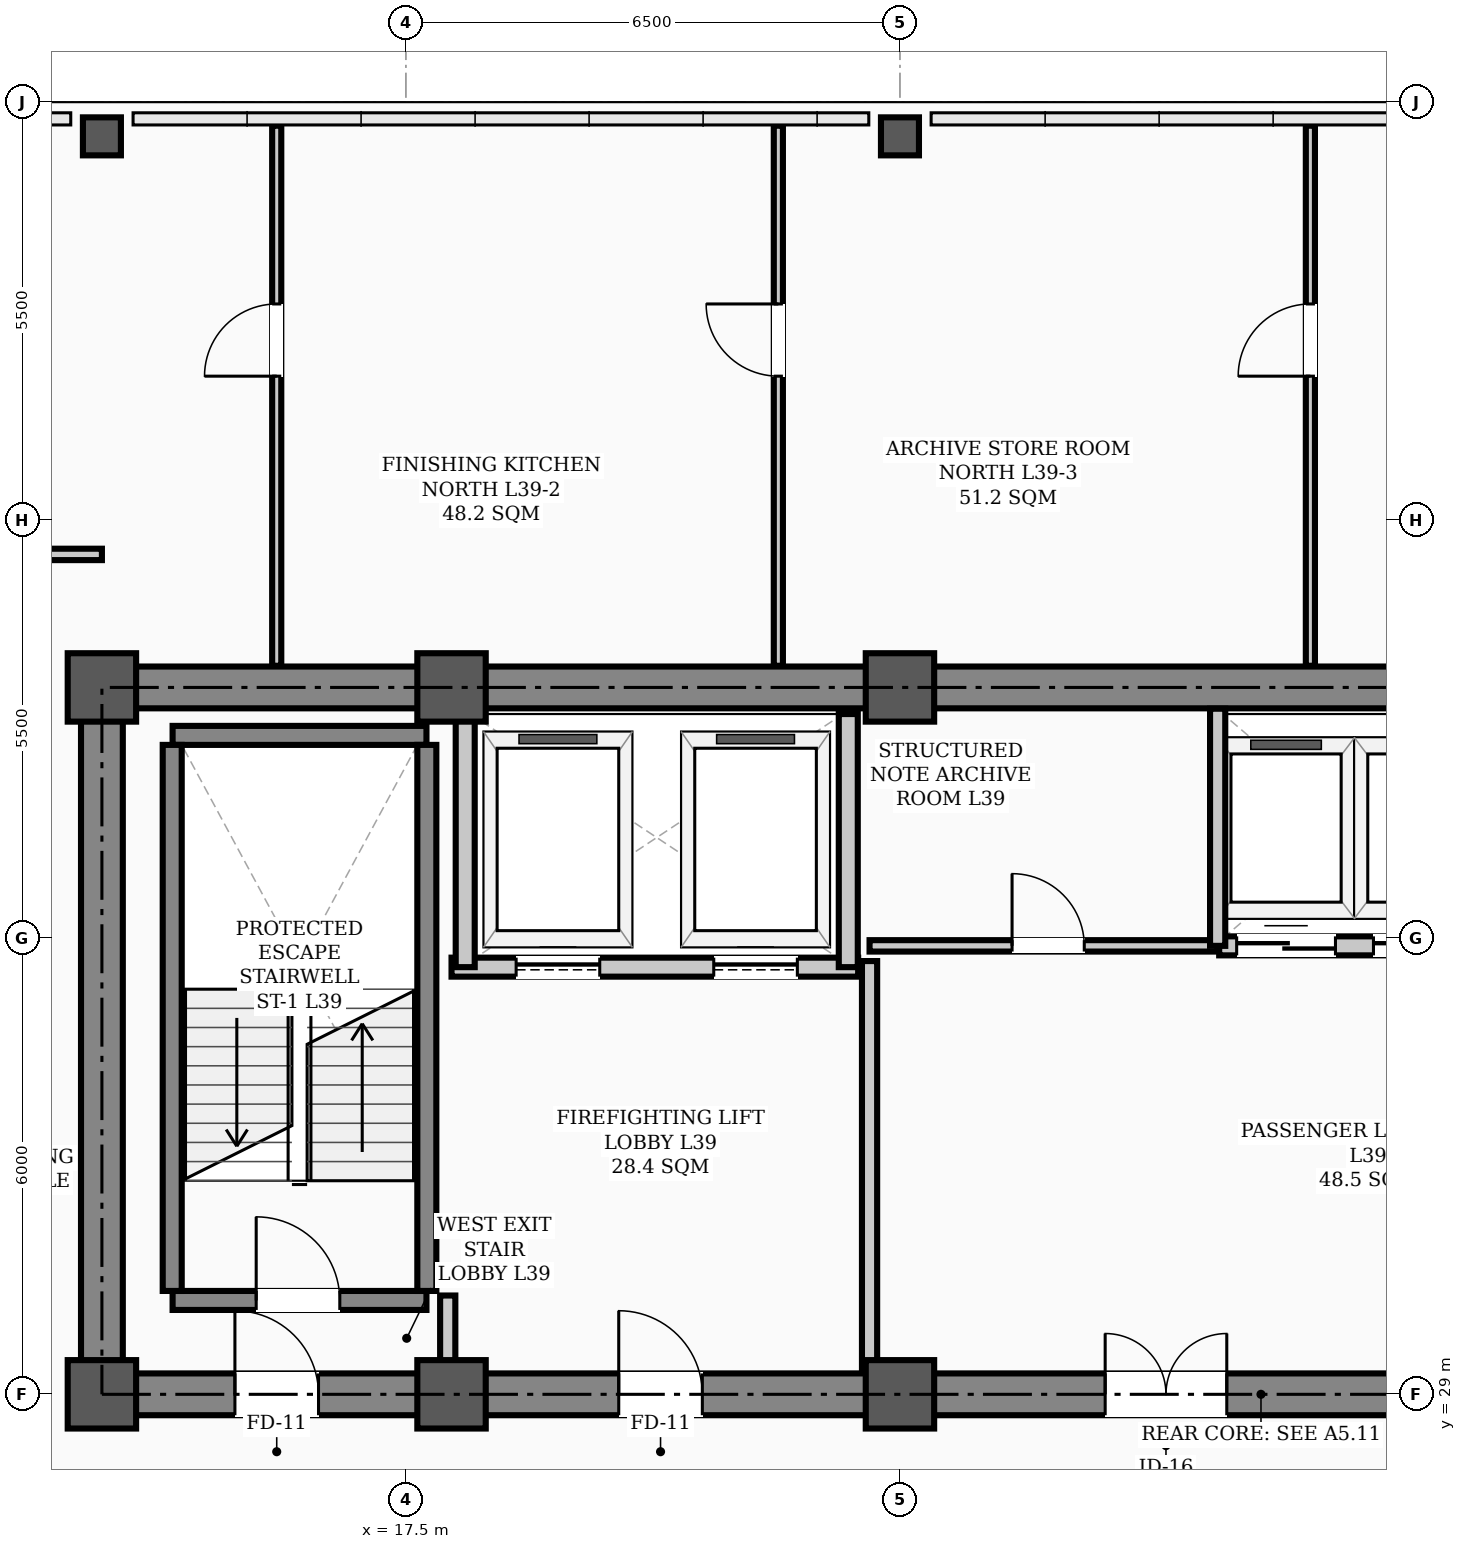
"""IFC4 building model, lengths in metres.
Left out: names, types, materials, properties, quantities, classifications, styles, units other than length and angle.
Written with IfcOpenShell. Run it as: python <this file> out.ifc"""

import sys

from ifc_helpers import new_model, si_unit, direction, frame, frame_2d, origin, origin_2d, place, context, subcontext, project, spatial, rectangle, hollow_rectangle, extrude, element, fill, save


model = new_model("IFC4")
c1 = context("Model", 3, precision=1e-05, world=origin(), true_north=direction((0.0, 1.0)))
c2 = subcontext(c1, "Body", "Model", "MODEL_VIEW")
j1 = project(units=[si_unit("LENGTHUNIT", "METRE"), si_unit("PLANEANGLEUNIT", "RADIAN")], contexts=[c1])
p1 = place(None, origin())
s1 = spatial("IfcSite", under=j1, at=p1, CompositionType="ELEMENT")
p2 = place(p1, origin())
s2 = spatial("IfcBuilding", under=s1, at=p2, CompositionType="ELEMENT")
p3 = place(p2, frame((0.0, 0.0, 157.8)))
s3 = spatial("IfcBuildingStorey", under=s2, at=p3, CompositionType="ELEMENT", Elevation=157.8)
for number, where, z_axis, x_axis in (
    (1, (13.5, 29.0, 0.0), (0.0, 0.0, 1.0), (1.0, 0.0, 0.0)),
    (2, (13.5, 38.3, 0.0), (0.0, 0.0, 1.0), (1.0, 0.0, 0.0)),
    (3, (18.1, 29.0, 0.0), (0.0, 0.0, 1.0), (1.0, 0.0, 0.0)),
    (4, (18.1, 38.3, 0.0), (0.0, 0.0, 1.0), (1.0, 0.0, 0.0)),
    (5, (24.0, 29.0, 0.0), (0.0, 0.0, 1.0), (1.0, 0.0, 0.0)),
    (6, (24.0, 38.3, 0.0), (0.0, 0.0, 1.0), (1.0, 0.0, 0.0)),
):
    element("IfcColumn", number, at=place(p3, frame(where, z_axis=z_axis, x_axis=x_axis)), inside=s3, PredefinedType="COLUMN", context=c2, shape_type="SweptSolid", body=[
        extrude(hollow_rectangle(XDim=0.9, YDim=0.9, WallThickness=0.035, InnerFilletRadius=0.017, OuterFilletRadius=0.052, at=origin_2d()), origin(), (0.0, 0.0, 1.0), 3.9),
    ])
for number, where, z_axis, x_axis in (
    (7, (13.5, 45.55, 0.0), (0.0, 0.0, 1.0), (1.0, 0.0, 0.0)),
    (8, (24.0, 45.55, 0.0), (0.0, 0.0, 1.0), (1.0, 0.0, 0.0)),
):
    element("IfcColumn", number, at=place(p3, frame(where, z_axis=z_axis, x_axis=x_axis)), inside=s3, PredefinedType="COLUMN", context=c2, shape_type="SweptSolid", body=[
        extrude(hollow_rectangle(XDim=0.5, YDim=0.5, WallThickness=0.024, InnerFilletRadius=0.012, OuterFilletRadius=0.036, at=origin_2d()), origin(), (0.0, 0.0, 1.0), 3.9),
    ])
p4 = place(p3, frame((13.5, 29.0, 0.0), z_axis=(0.0, 0.0, 1.0), x_axis=(1.0, 0.0, 0.0)))
e9 = element("IfcWall", 9, at=p4, inside=s3, PredefinedType="SHEAR", context=c2, shape_type="SweptSolid", body=[
    extrude(rectangle(XDim=30.5, YDim=0.55, at=frame_2d((15.25, 0.0))), origin(), (0.0, 0.0, 1.0), 3.72),
])
p5 = place(p4, frame((1.75, 0.0, 0.0)))
e10 = element("IfcOpeningElement", 10, at=p5, cuts=e9, PredefinedType="OPENING", context=c2, shape_type="SweptSolid", body=[
    extrude(rectangle(XDim=1.1, YDim=2.08, at=frame_2d((0.55, 1.04))), frame((0.0, 0.285, 0.0), z_axis=(0.0, -1.0, 0.0), x_axis=(1.0, 0.0, 0.0)), (0.0, 0.0, 1.0), 0.57),
])
p6 = place(p4, frame((26.7, 0.0, 0.0)))
e11 = element("IfcOpeningElement", 11, at=p6, cuts=e9, PredefinedType="OPENING", context=c2, shape_type="SweptSolid", body=[
    extrude(rectangle(XDim=1.1, YDim=2.08, at=frame_2d((0.55, 1.04))), frame((0.0, 0.285, 0.0), z_axis=(0.0, -1.0, 0.0), x_axis=(1.0, 0.0, 0.0)), (0.0, 0.0, 1.0), 0.57),
])
p7 = place(p4, frame((6.8, 0.0, 0.0)))
e12 = element("IfcOpeningElement", 12, at=p7, cuts=e9, PredefinedType="OPENING", context=c2, shape_type="SweptSolid", body=[
    extrude(rectangle(XDim=1.1, YDim=2.08, at=frame_2d((0.55, 1.04))), frame((0.0, 0.285, 0.0), z_axis=(0.0, -1.0, 0.0), x_axis=(1.0, 0.0, 0.0)), (0.0, 0.0, 1.0), 0.57),
])
p8 = place(p4, frame((13.2, 0.0, 0.0)))
e13 = element("IfcOpeningElement", 13, at=p8, cuts=e9, PredefinedType="OPENING", context=c2, shape_type="SweptSolid", body=[
    extrude(rectangle(XDim=1.6, YDim=2.08, at=frame_2d((0.8, 1.04))), frame((0.0, 0.285, 0.0), z_axis=(0.0, -1.0, 0.0), x_axis=(1.0, 0.0, 0.0)), (0.0, 0.0, 1.0), 0.57),
])
p9 = place(p4, frame((19.6, 0.0, 0.0)))
e14 = element("IfcOpeningElement", 14, at=p9, cuts=e9, PredefinedType="OPENING", context=c2, shape_type="SweptSolid", body=[
    extrude(rectangle(XDim=0.9, YDim=2.08, at=frame_2d((0.45, 1.04))), frame((0.0, 0.285, 0.0), z_axis=(0.0, -1.0, 0.0), x_axis=(1.0, 0.0, 0.0)), (0.0, 0.0, 1.0), 0.57),
])
p10 = place(p4, frame((21.6, 0.0, 0.0)))
e15 = element("IfcOpeningElement", 15, at=p10, cuts=e9, PredefinedType="OPENING", context=c2, shape_type="SweptSolid", body=[
    extrude(rectangle(XDim=0.9, YDim=2.08, at=frame_2d((0.45, 1.04))), frame((0.0, 0.285, 0.0), z_axis=(0.0, -1.0, 0.0), x_axis=(1.0, 0.0, 0.0)), (0.0, 0.0, 1.0), 0.57),
])
p11 = place(p3, frame((13.5, 38.3, 0.0), z_axis=(0.0, 0.0, 1.0), x_axis=(1.0, 0.0, 0.0)))
e16 = element("IfcWall", 16, at=p11, inside=s3, PredefinedType="SHEAR", context=c2, shape_type="SweptSolid", body=[
    extrude(rectangle(XDim=30.5, YDim=0.55, at=frame_2d((15.25, 0.0))), origin(), (0.0, 0.0, 1.0), 3.72),
])
p12 = place(p3, frame((13.5, 29.35, 0.0), z_axis=(0.0, 0.0, 1.0), x_axis=(0.0, 1.0, 0.0)))
e17 = element("IfcWall", 17, at=p12, inside=s3, PredefinedType="SHEAR", context=c2, shape_type="SweptSolid", body=[
    extrude(rectangle(XDim=8.6, YDim=0.55, at=frame_2d((4.3, 0.0))), origin(), (0.0, 0.0, 1.0), 3.72),
])
p13 = place(p3, frame((14.43, 30.235, 0.0), z_axis=(0.0, 0.0, 1.0), x_axis=(1.0, 0.0, 0.0)))
e18 = element("IfcWall", 18, at=p13, inside=s3, PredefinedType="STANDARD", context=c2, shape_type="SweptSolid", body=[
    extrude(rectangle(XDim=3.34, YDim=0.25, at=frame_2d((1.67, 0.0))), origin(), (0.0, 0.0, 1.0), 3.72),
])
p14 = place(p13, frame((1.1, 0.0, 0.0)))
e19 = element("IfcOpeningElement", 19, at=p14, cuts=e18, PredefinedType="OPENING", context=c2, shape_type="SweptSolid", body=[
    extrude(rectangle(XDim=1.1, YDim=2.08, at=frame_2d((0.55, 1.04))), frame((0.0, 0.135, 0.0), z_axis=(0.0, -1.0, 0.0), x_axis=(1.0, 0.0, 0.0)), (0.0, 0.0, 1.0), 0.27),
])
p15 = place(p3, frame((14.43, 37.669, 0.0), z_axis=(0.0, 0.0, 1.0), x_axis=(1.0, 0.0, 0.0)))
e20 = element("IfcWall", 20, at=p15, inside=s3, PredefinedType="STANDARD", context=c2, shape_type="SweptSolid", body=[
    extrude(rectangle(XDim=3.34, YDim=0.25, at=frame_2d((1.67, 0.0))), origin(), (0.0, 0.0, 1.0), 3.72),
])
for number, where, z_axis, x_axis in (
    (21, (14.425, 30.36, 0.0), (0.0, 0.0, 1.0), (0.0, 1.0, 0.0)),
    (22, (17.775, 30.36, 0.0), (0.0, 0.0, 1.0), (0.0, 1.0, 0.0)),
):
    element("IfcWall", number, at=place(p3, frame(where, z_axis=z_axis, x_axis=x_axis)), inside=s3, PredefinedType="STANDARD", context=c2, shape_type="SweptSolid", body=[
        extrude(rectangle(XDim=7.184, YDim=0.25, at=frame_2d((3.592, 0.0))), origin(), (0.0, 0.0, 1.0), 3.72),
    ])
p16 = place(p3, frame((18.1, 34.62, 0.0), z_axis=(0.0, 0.0, 1.0), x_axis=(1.0, 0.0, 0.0)))
e23 = element("IfcWall", 23, at=p16, inside=s3, PredefinedType="STANDARD", context=c2, shape_type="SweptSolid", body=[
    extrude(rectangle(XDim=5.35, YDim=0.25, at=frame_2d((2.675, 0.0))), origin(), (0.0, 0.0, 1.0), 3.72),
])
p17 = place(p16, frame((0.85, 0.0, 0.0)))
e24 = element("IfcOpeningElement", 24, at=p17, cuts=e23, PredefinedType="OPENING", context=c2, shape_type="SweptSolid", body=[
    extrude(rectangle(XDim=1.1, YDim=2.08, at=frame_2d((0.55, 1.04))), frame((0.0, 0.135, 0.0), z_axis=(0.0, -1.0, 0.0), x_axis=(1.0, 0.0, 0.0)), (0.0, 0.0, 1.0), 0.27),
])
p18 = place(p16, frame((3.45, 0.0, 0.0)))
e25 = element("IfcOpeningElement", 25, at=p18, cuts=e23, PredefinedType="OPENING", context=c2, shape_type="SweptSolid", body=[
    extrude(rectangle(XDim=1.1, YDim=2.08, at=frame_2d((0.55, 1.04))), frame((0.0, 0.135, 0.0), z_axis=(0.0, -1.0, 0.0), x_axis=(1.0, 0.0, 0.0)), (0.0, 0.0, 1.0), 0.27),
])
for number, where, z_axis, x_axis in (
    (26, (18.28, 34.62, 0.0), (0.0, 0.0, 1.0), (0.0, 1.0, 0.0)),
    (27, (23.32, 34.62, 0.0), (0.0, 0.0, 1.0), (0.0, 1.0, 0.0)),
):
    element("IfcWall", number, at=place(p3, frame(where, z_axis=z_axis, x_axis=x_axis)), inside=s3, PredefinedType="STANDARD", context=c2, shape_type="SweptSolid", body=[
        extrude(rectangle(XDim=3.33, YDim=0.25, at=frame_2d((1.665, 0.0))), origin(), (0.0, 0.0, 1.0), 3.35),
    ])
p19 = place(p3, frame((28.2, 34.9, 0.0), z_axis=(0.0, 0.0, 1.0), x_axis=(1.0, 0.0, 0.0)))
e28 = element("IfcWall", 28, at=p19, inside=s3, PredefinedType="STANDARD", context=c2, shape_type="SweptSolid", body=[
    extrude(rectangle(XDim=3.55, YDim=0.25, at=frame_2d((1.775, 0.0))), origin(), (0.0, 0.0, 1.0), 3.72),
])
p20 = place(p19, frame((0.23, 0.0, 0.0)))
e29 = element("IfcOpeningElement", 29, at=p20, cuts=e28, PredefinedType="OPENING", context=c2, shape_type="SweptSolid", body=[
    extrude(rectangle(XDim=1.3, YDim=2.08, at=frame_2d((0.65, 1.04))), frame((0.0, 0.135, 0.0), z_axis=(0.0, -1.0, 0.0), x_axis=(1.0, 0.0, 0.0)), (0.0, 0.0, 1.0), 0.27),
])
p21 = place(p19, frame((2.03, 0.0, 0.0)))
e30 = element("IfcOpeningElement", 30, at=p21, cuts=e28, PredefinedType="OPENING", context=c2, shape_type="SweptSolid", body=[
    extrude(rectangle(XDim=1.3, YDim=2.08, at=frame_2d((0.65, 1.04))), frame((0.0, 0.135, 0.0), z_axis=(0.0, -1.0, 0.0), x_axis=(1.0, 0.0, 0.0)), (0.0, 0.0, 1.0), 0.27),
])
p22 = place(p3, frame((23.6, 34.9, 0.0), z_axis=(0.0, 0.0, 1.0), x_axis=(1.0, 0.0, 0.0)))
e31 = element("IfcWall", 31, at=p22, inside=s3, PredefinedType="PARTITIONING", context=c2, shape_type="SweptSolid", body=[
    extrude(rectangle(XDim=4.58, YDim=0.15, at=frame_2d((2.29, 0.0))), origin(), (0.0, 0.0, 1.0), 3.72),
])
p23 = place(p22, frame((1.875, 0.0, 0.0)))
e32 = element("IfcOpeningElement", 32, at=p23, cuts=e31, PredefinedType="OPENING", context=c2, shape_type="SweptSolid", body=[
    extrude(rectangle(XDim=0.95, YDim=2.08, at=frame_2d((0.475, 1.04))), frame((0.0, 0.085, 0.0), z_axis=(0.0, -1.0, 0.0), x_axis=(1.0, 0.0, 0.0)), (0.0, 0.0, 1.0), 0.17),
])
p24 = place(p3, frame((2.31, 40.05, 0.0), z_axis=(0.0, 0.0, 1.0), x_axis=(1.0, 0.0, 0.0)))
e33 = element("IfcWall", 33, at=p24, inside=s3, PredefinedType="PARTITIONING", context=c2, shape_type="SweptSolid", body=[
    extrude(rectangle(XDim=11.19, YDim=0.15, at=frame_2d((5.595, 0.0))), origin(), (0.0, 0.0, 1.0), 3.2),
])
p25 = place(p24, frame((9.165, 0.0, 0.0)))
e34 = element("IfcOpeningElement", 34, at=p25, cuts=e33, PredefinedType="OPENING", context=c2, shape_type="SweptSolid", body=[
    extrude(rectangle(XDim=0.95, YDim=2.08, at=frame_2d((0.475, 1.04))), frame((0.0, 0.085, 0.0), z_axis=(0.0, -1.0, 0.0), x_axis=(1.0, 0.0, 0.0)), (0.0, 0.0, 1.0), 0.17),
])
p26 = place(p3, frame((18.05, 29.285, 0.0), z_axis=(0.0, 0.0, 1.0), x_axis=(0.0, 1.0, 0.0)))
e35 = element("IfcWall", 35, at=p26, inside=s3, PredefinedType="STANDARD", context=c2, shape_type="SweptSolid", body=[
    extrude(rectangle(XDim=1.015, YDim=0.2, at=frame_2d((0.508, 0.0))), origin(), (0.0, 0.0, 1.0), 3.35),
])
p27 = place(p3, frame((23.6, 29.285, 0.0), z_axis=(0.0, 0.0, 1.0), x_axis=(0.0, 1.0, 0.0)))
e36 = element("IfcWall", 36, at=p27, inside=s3, PredefinedType="STANDARD", context=c2, shape_type="SweptSolid", body=[
    extrude(rectangle(XDim=5.415, YDim=0.2, at=frame_2d((2.708, 0.0))), origin(), (0.0, 0.0, 1.0), 3.2),
])
p28 = place(p3, frame((15.8, 38.585, 0.0), z_axis=(0.0, 0.0, 1.0), x_axis=(0.0, 1.0, 0.0)))
e37 = element("IfcWall", 37, at=p28, inside=s3, PredefinedType="PARTITIONING", context=c2, shape_type="SweptSolid", body=[
    extrude(rectangle(XDim=7.105, YDim=0.12, at=frame_2d((3.552, 0.0))), origin(), (0.0, 0.0, 1.0), 3.212),
])
p29 = place(p28, frame((3.81, 0.0, 0.0)))
e38 = element("IfcOpeningElement", 38, at=p29, cuts=e37, PredefinedType="OPENING", context=c2, shape_type="SweptSolid", body=[
    extrude(rectangle(XDim=0.95, YDim=2.08, at=frame_2d((0.475, 1.04))), frame((0.0, 0.07, 0.0), z_axis=(0.0, -1.0, 0.0), x_axis=(1.0, 0.0, 0.0)), (0.0, 0.0, 1.0), 0.14),
])
p30 = place(p3, frame((22.4, 38.585, 0.0), z_axis=(0.0, 0.0, 1.0), x_axis=(0.0, 1.0, 0.0)))
e39 = element("IfcWall", 39, at=p30, inside=s3, PredefinedType="PARTITIONING", context=c2, shape_type="SweptSolid", body=[
    extrude(rectangle(XDim=7.105, YDim=0.12, at=frame_2d((3.552, 0.0))), origin(), (0.0, 0.0, 1.0), 3.212),
])
p31 = place(p30, frame((3.81, 0.0, 0.0)))
e40 = element("IfcOpeningElement", 40, at=p31, cuts=e39, PredefinedType="OPENING", context=c2, shape_type="SweptSolid", body=[
    extrude(rectangle(XDim=0.95, YDim=2.08, at=frame_2d((0.475, 1.04))), frame((0.0, 0.07, 0.0), z_axis=(0.0, -1.0, 0.0), x_axis=(1.0, 0.0, 0.0)), (0.0, 0.0, 1.0), 0.14),
])
p32 = place(p3, frame((29.4, 38.585, 0.0), z_axis=(0.0, 0.0, 1.0), x_axis=(0.0, 1.0, 0.0)))
e41 = element("IfcWall", 41, at=p32, inside=s3, PredefinedType="PARTITIONING", context=c2, shape_type="SweptSolid", body=[
    extrude(rectangle(XDim=7.105, YDim=0.12, at=frame_2d((3.552, 0.0))), origin(), (0.0, 0.0, 1.0), 3.212),
])
p33 = place(p32, frame((3.81, 0.0, 0.0)))
e42 = element("IfcOpeningElement", 42, at=p33, cuts=e41, PredefinedType="OPENING", context=c2, shape_type="SweptSolid", body=[
    extrude(rectangle(XDim=0.95, YDim=2.08, at=frame_2d((0.475, 1.04))), frame((0.0, 0.07, 0.0), z_axis=(0.0, -1.0, 0.0), x_axis=(1.0, 0.0, 0.0)), (0.0, 0.0, 1.0), 0.14),
])
p34 = place(p3, frame((28.18, 34.9, 0.0), z_axis=(0.0, 0.0, 1.0), x_axis=(0.0, 1.0, 0.0)))
e43 = element("IfcWall", 43, at=p34, inside=s3, PredefinedType="STANDARD", context=c2, shape_type="SweptSolid", body=[
    extrude(rectangle(XDim=3.12, YDim=0.2, at=frame_2d((1.56, 0.0))), origin(), (0.0, 0.0, 1.0), 3.35),
])
p35 = place(p14, origin())
e44 = element("IfcDoor", 44, at=p35, inside=s3, OperationType="SINGLE_SWING_LEFT", PredefinedType="DOOR", context=c2, shape_type="SweptSolid", body=[
    extrude(rectangle(XDim=1.1, YDim=2.08, at=frame_2d((0.55, 1.04))), frame((0.0, 0.025, 0.0), z_axis=(0.0, -1.0, 0.0), x_axis=(1.0, 0.0, 0.0)), (0.0, 0.0, 1.0), 0.05),
])
fill(e19, e44)
p36 = place(p5, origin())
e45 = element("IfcDoor", 45, at=p36, inside=s3, OperationType="SINGLE_SWING_LEFT", PredefinedType="DOOR", context=c2, shape_type="SweptSolid", body=[
    extrude(rectangle(XDim=1.1, YDim=2.08, at=frame_2d((0.55, 1.04))), frame((0.0, 0.025, 0.0), z_axis=(0.0, -1.0, 0.0), x_axis=(1.0, 0.0, 0.0)), (0.0, 0.0, 1.0), 0.05),
])
fill(e10, e45)
p37 = place(p7, origin())
e46 = element("IfcDoor", 46, at=p37, inside=s3, OperationType="SINGLE_SWING_LEFT", PredefinedType="DOOR", context=c2, shape_type="SweptSolid", body=[
    extrude(rectangle(XDim=1.1, YDim=2.08, at=frame_2d((0.55, 1.04))), frame((0.0, 0.025, 0.0), z_axis=(0.0, -1.0, 0.0), x_axis=(1.0, 0.0, 0.0)), (0.0, 0.0, 1.0), 0.05),
])
fill(e12, e46)
p38 = place(p8, origin())
e47 = element("IfcDoor", 47, at=p38, inside=s3, OperationType="DOUBLE_DOOR_SINGLE_SWING", PredefinedType="DOOR", context=c2, shape_type="SweptSolid", body=[
    extrude(rectangle(XDim=1.6, YDim=2.08, at=frame_2d((0.8, 1.04))), frame((0.0, 0.025, 0.0), z_axis=(0.0, -1.0, 0.0), x_axis=(1.0, 0.0, 0.0)), (0.0, 0.0, 1.0), 0.05),
])
fill(e13, e47)
p39 = place(p23, origin())
e48 = element("IfcDoor", 48, at=p39, inside=s3, OperationType="SINGLE_SWING_LEFT", PredefinedType="DOOR", context=c2, shape_type="SweptSolid", body=[
    extrude(rectangle(XDim=0.95, YDim=2.08, at=frame_2d((0.475, 1.04))), frame((0.0, 0.025, 0.0), z_axis=(0.0, -1.0, 0.0), x_axis=(1.0, 0.0, 0.0)), (0.0, 0.0, 1.0), 0.05),
])
fill(e32, e48)
p40 = place(p29, origin())
e49 = element("IfcDoor", 49, at=p40, inside=s3, OperationType="SINGLE_SWING_LEFT", PredefinedType="DOOR", context=c2, shape_type="SweptSolid", body=[
    extrude(rectangle(XDim=0.95, YDim=2.08, at=frame_2d((0.475, 1.04))), frame((0.0, 0.025, 0.0), z_axis=(0.0, -1.0, 0.0), x_axis=(1.0, 0.0, 0.0)), (0.0, 0.0, 1.0), 0.05),
])
fill(e38, e49)
p41 = place(p31, origin())
e50 = element("IfcDoor", 50, at=p41, inside=s3, OperationType="SINGLE_SWING_RIGHT", PredefinedType="DOOR", context=c2, shape_type="SweptSolid", body=[
    extrude(rectangle(XDim=0.95, YDim=2.08, at=frame_2d((0.475, 1.04))), frame((0.0, 0.025, 0.0), z_axis=(0.0, -1.0, 0.0), x_axis=(1.0, 0.0, 0.0)), (0.0, 0.0, 1.0), 0.05),
])
fill(e40, e50)
p42 = place(p33, origin())
e51 = element("IfcDoor", 51, at=p42, inside=s3, OperationType="SINGLE_SWING_LEFT", PredefinedType="DOOR", context=c2, shape_type="SweptSolid", body=[
    extrude(rectangle(XDim=0.95, YDim=2.08, at=frame_2d((0.475, 1.04))), frame((0.0, 0.025, 0.0), z_axis=(0.0, -1.0, 0.0), x_axis=(1.0, 0.0, 0.0)), (0.0, 0.0, 1.0), 0.05),
])
fill(e42, e51)
p43 = place(p17, origin())
e52 = element("IfcDoor", 52, at=p43, inside=s3, OperationType="SLIDING_TO_LEFT", PredefinedType="DOOR", context=c2, shape_type="SweptSolid", body=[
    extrude(rectangle(XDim=1.1, YDim=2.08, at=frame_2d((0.55, 1.04))), frame((0.0, 0.025, 0.0), z_axis=(0.0, -1.0, 0.0), x_axis=(1.0, 0.0, 0.0)), (0.0, 0.0, 1.0), 0.05),
])
fill(e24, e52)
p44 = place(p18, origin())
e53 = element("IfcDoor", 53, at=p44, inside=s3, OperationType="SLIDING_TO_LEFT", PredefinedType="DOOR", context=c2, shape_type="SweptSolid", body=[
    extrude(rectangle(XDim=1.1, YDim=2.08, at=frame_2d((0.55, 1.04))), frame((0.0, 0.025, 0.0), z_axis=(0.0, -1.0, 0.0), x_axis=(1.0, 0.0, 0.0)), (0.0, 0.0, 1.0), 0.05),
])
fill(e25, e53)
p45 = place(p20, origin())
e54 = element("IfcDoor", 54, at=p45, inside=s3, OperationType="DOUBLE_DOOR_SLIDING", PredefinedType="DOOR", context=c2, shape_type="SweptSolid", body=[
    extrude(rectangle(XDim=1.3, YDim=2.08, at=frame_2d((0.65, 1.04))), frame((0.0, 0.025, 0.0), z_axis=(0.0, -1.0, 0.0), x_axis=(1.0, 0.0, 0.0)), (0.0, 0.0, 1.0), 0.05),
])
fill(e29, e54)
p46 = place(p21, origin())
e55 = element("IfcDoor", 55, at=p46, inside=s3, OperationType="DOUBLE_DOOR_SLIDING", PredefinedType="DOOR", context=c2, shape_type="SweptSolid", body=[
    extrude(rectangle(XDim=1.3, YDim=2.08, at=frame_2d((0.65, 1.04))), frame((0.0, 0.025, 0.0), z_axis=(0.0, -1.0, 0.0), x_axis=(1.0, 0.0, 0.0)), (0.0, 0.0, 1.0), 0.05),
])
fill(e30, e55)
save(model, sys.argv[1])
